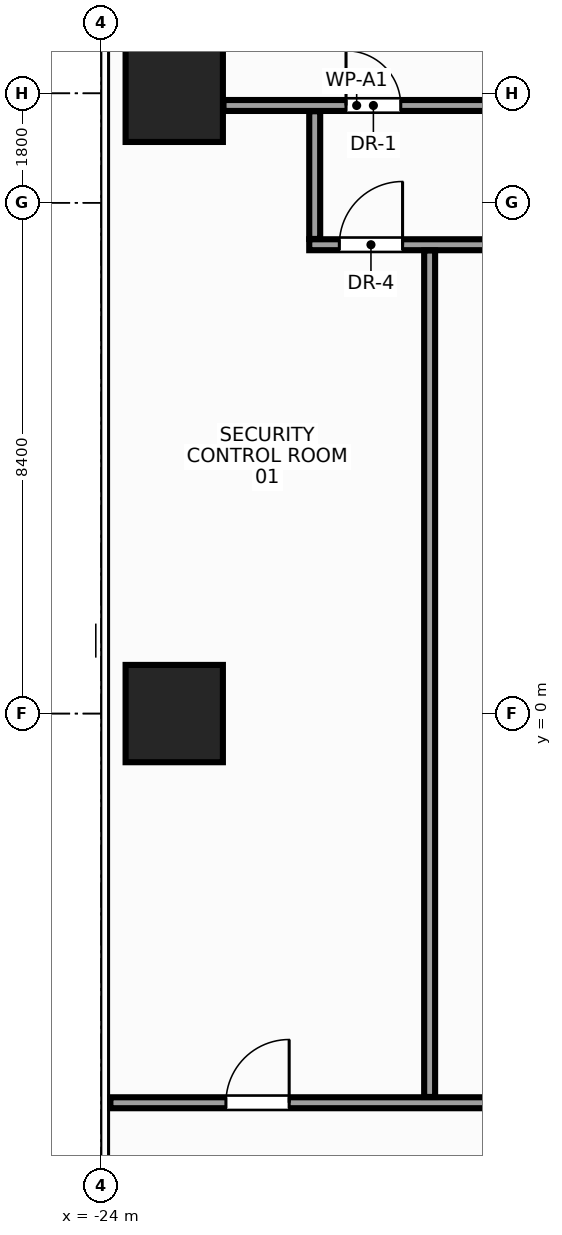
"""IFC4 building model, lengths in metres.
Left out: names, types, materials, properties, quantities, classifications, styles, units other than length and angle.
Written with IfcOpenShell. Run it as: python <this file> out.ifc"""

import sys

from ifc_helpers import new_model, si_unit, direction, frame, frame_2d, origin, origin_2d, place, context, subcontext, project, spatial, rectangle, extrude, source, transform, mapped, element, fill, save


model = new_model("IFC4")
c1 = context("Model", 3, precision=1e-05, world=origin(), true_north=direction((0.0, 1.0)))
c2 = subcontext(c1, "Body", "Model", "MODEL_VIEW")
j1 = project(units=[si_unit("LENGTHUNIT", "METRE"), si_unit("PLANEANGLEUNIT", "RADIAN")], contexts=[c1])
p1 = place(None, origin())
s1 = spatial("IfcSite", under=j1, at=p1, CompositionType="ELEMENT")
p2 = place(p1, origin())
s2 = spatial("IfcBuilding", under=s1, at=p2, CompositionType="ELEMENT")
p3 = place(p2, frame((0.0, 0.0, 171.2)))
s3 = spatial("IfcBuildingStorey", under=s2, at=p3, CompositionType="ELEMENT", Elevation=171.2)
m1 = source(origin(), c2, "Body", "SweptSolid", [
    extrude(rectangle(XDim=1.6, YDim=1.6, at=origin_2d()), origin(), (0.0, 0.0, 1.0), 3.6),
])
for number, where, z_axis, x_axis in (
    (1, (-22.8, 0.0, 0.0), (0.0, 0.0, 1.0), (1.0, 0.0, 0.0)),
    (2, (-22.8, 10.2, 0.0), (0.0, 0.0, 1.0), (1.0, 0.0, 0.0)),
):
    element("IfcColumn", number, at=place(p3, frame(where, z_axis=z_axis, x_axis=x_axis)), inside=s3, PredefinedType="COLUMN", context=c2, shape_type="MappedRepresentation", body=[
        mapped(m1, transform((0.0, 0.0, 0.0), x_axis=(1.0, 0.0, 0.0), y_axis=(0.0, 1.0, 0.0), z_axis=(0.0, 0.0, 1.0), scale=1.0)),
    ])
m2 = source(origin(), c2, "Body", "SweptSolid", [
    extrude(rectangle(XDim=4.38, YDim=0.18, at=frame_2d((2.19, 0.0))), origin(), (0.0, 0.0, 1.0), 2.915),
])
p4 = place(p3, frame((-21.99, 10.0, 0.0), z_axis=(0.0, 0.0, 1.0), x_axis=(1.0, 0.0, 0.0)))
e3 = element("IfcWall", 3, at=p4, inside=s3, PredefinedType="PARTITIONING", context=c2, shape_type="MappedRepresentation", body=[
    mapped(m2, transform((0.0, 0.0, 0.0), x_axis=(1.0, 0.0, 0.0), y_axis=(0.0, 1.0, 0.0), z_axis=(0.0, 0.0, 1.0), scale=1.0)),
])
p5 = place(p4, frame((2.015, 0.0, 0.0)))
e4 = element("IfcOpeningElement", 4, at=p5, cuts=e3, PredefinedType="OPENING", context=c2, shape_type="SweptSolid", body=[
    extrude(rectangle(XDim=0.9, YDim=2.15, at=frame_2d((0.45, 1.075))), frame((0.0, 0.102, 0.0), z_axis=(0.0, -1.0, 0.0), x_axis=(1.0, 0.0, 0.0)), (0.0, 0.0, 1.0), 0.204),
])
m3 = source(origin(), c2, "Body", "SweptSolid", [
    extrude(rectangle(XDim=31.6, YDim=0.18, at=frame_2d((15.8, 0.0))), origin(), (0.0, 0.0, 1.0), 2.765),
])
p6 = place(p3, frame((-20.58, 7.71, 0.0), z_axis=(0.0, 0.0, 1.0), x_axis=(1.0, 0.0, 0.0)))
e5 = element("IfcWall", 5, at=p6, inside=s3, PredefinedType="PARTITIONING", context=c2, shape_type="MappedRepresentation", body=[
    mapped(m3, transform((0.0, 0.0, 0.0), x_axis=(1.0, 0.0, 0.0), y_axis=(0.0, 1.0, 0.0), z_axis=(0.0, 0.0, 1.0), scale=1.0)),
])
p7 = place(p6, frame((0.495, 0.0, 0.0)))
e6 = element("IfcOpeningElement", 6, at=p7, cuts=e5, PredefinedType="OPENING", context=c2, shape_type="SweptSolid", body=[
    extrude(rectangle(XDim=1.04, YDim=2.2, at=frame_2d((0.52, 1.1))), frame((0.0, 0.102, 0.0), z_axis=(0.0, -1.0, 0.0), x_axis=(1.0, 0.0, 0.0)), (0.0, 0.0, 1.0), 0.204),
])
p8 = place(p6, frame((5.16, 0.0, 0.0)))
e7 = element("IfcOpeningElement", 7, at=p8, cuts=e5, PredefinedType="OPENING", context=c2, shape_type="SweptSolid", body=[
    extrude(rectangle(XDim=1.04, YDim=2.2, at=frame_2d((0.52, 1.1))), frame((0.0, 0.102, 0.0), z_axis=(0.0, -1.0, 0.0), x_axis=(1.0, 0.0, 0.0)), (0.0, 0.0, 1.0), 0.204),
])
p9 = place(p6, frame((19.86, 0.0, 0.0)))
e8 = element("IfcOpeningElement", 8, at=p9, cuts=e5, PredefinedType="OPENING", context=c2, shape_type="SweptSolid", body=[
    extrude(rectangle(XDim=1.04, YDim=2.2, at=frame_2d((0.52, 1.1))), frame((0.0, 0.102, 0.0), z_axis=(0.0, -1.0, 0.0), x_axis=(1.0, 0.0, 0.0)), (0.0, 0.0, 1.0), 0.204),
])
m4 = source(origin(), c2, "Body", "SweptSolid", [
    extrude(rectangle(XDim=2.1, YDim=0.18, at=frame_2d((1.05, 0.0))), origin(), (0.0, 0.0, 1.0), 3.38),
])
p10 = place(p3, frame((-20.49, 7.805, 0.0), z_axis=(0.0, 0.0, 1.0), x_axis=(0.0, 1.0, 0.0)))
e9 = element("IfcWall", 9, at=p10, inside=s3, PredefinedType="PARTITIONING", context=c2, shape_type="MappedRepresentation", body=[
    mapped(m4, transform((0.0, 0.0, 0.0), x_axis=(1.0, 0.0, 0.0), y_axis=(0.0, 1.0, 0.0), z_axis=(0.0, 0.0, 1.0), scale=1.0)),
])
m5 = source(origin(), c2, "Body", "SweptSolid", [
    extrude(rectangle(XDim=34.865, YDim=0.18, at=frame_2d((17.433, 0.0))), origin(), (0.0, 0.0, 1.0), 2.765),
])
p11 = place(p3, frame((-23.85, -6.4, 0.0), z_axis=(0.0, 0.0, 1.0), x_axis=(1.0, 0.0, 0.0)))
e10 = element("IfcWall", 10, at=p11, inside=s3, PredefinedType="PARTITIONING", context=c2, shape_type="MappedRepresentation", body=[
    mapped(m5, transform((0.0, 0.0, 0.0), x_axis=(1.0, 0.0, 0.0), y_axis=(0.0, 1.0, 0.0), z_axis=(0.0, 0.0, 1.0), scale=1.0)),
])
p12 = place(p11, frame((1.9, 0.0, 0.0)))
e11 = element("IfcOpeningElement", 11, at=p12, cuts=e10, PredefinedType="OPENING", context=c2, shape_type="SweptSolid", body=[
    extrude(rectangle(XDim=1.04, YDim=2.2, at=frame_2d((0.52, 1.1))), frame((0.0, 0.102, 0.0), z_axis=(0.0, -1.0, 0.0), x_axis=(1.0, 0.0, 0.0)), (0.0, 0.0, 1.0), 0.204),
])
p13 = place(p11, frame((9.33, 0.0, 0.0)))
e12 = element("IfcOpeningElement", 12, at=p13, cuts=e10, PredefinedType="OPENING", context=c2, shape_type="SweptSolid", body=[
    extrude(rectangle(XDim=1.04, YDim=2.2, at=frame_2d((0.52, 1.1))), frame((0.0, 0.102, 0.0), z_axis=(0.0, -1.0, 0.0), x_axis=(1.0, 0.0, 0.0)), (0.0, 0.0, 1.0), 0.204),
])
p14 = place(p11, frame((21.33, 0.0, 0.0)))
e13 = element("IfcOpeningElement", 13, at=p14, cuts=e10, PredefinedType="OPENING", context=c2, shape_type="SweptSolid", body=[
    extrude(rectangle(XDim=1.04, YDim=2.2, at=frame_2d((0.52, 1.1))), frame((0.0, 0.102, 0.0), z_axis=(0.0, -1.0, 0.0), x_axis=(1.0, 0.0, 0.0)), (0.0, 0.0, 1.0), 0.204),
])
m6 = source(origin(), c2, "Body", "SweptSolid", [
    extrude(rectangle(XDim=13.92, YDim=0.18, at=frame_2d((6.96, 0.0))), origin(), (0.0, 0.0, 1.0), 2.915),
])
p15 = place(p3, frame((-18.6, -6.305, 0.0), z_axis=(0.0, 0.0, 1.0), x_axis=(0.0, 1.0, 0.0)))
e14 = element("IfcWall", 14, at=p15, inside=s3, PredefinedType="PARTITIONING", context=c2, shape_type="MappedRepresentation", body=[
    mapped(m6, transform((0.0, 0.0, 0.0), x_axis=(1.0, 0.0, 0.0), y_axis=(0.0, 1.0, 0.0), z_axis=(0.0, 0.0, 1.0), scale=1.0)),
])
m7 = source(origin(), c2, "Body", "SweptSolid", [
    extrude(rectangle(XDim=0.9, YDim=2.15, at=frame_2d((0.45, 1.075))), frame((0.0, 0.025, 0.0), z_axis=(0.0, -1.0, 0.0), x_axis=(1.0, 0.0, 0.0)), (0.0, 0.0, 1.0), 0.05),
])
p16 = place(p5, origin())
e15 = element("IfcDoor", 15, at=p16, inside=s3, OperationType="SINGLE_SWING_LEFT", PredefinedType="DOOR", context=c2, shape_type="MappedRepresentation", body=[
    mapped(m7, transform((0.0, 0.0, 0.0), x_axis=(1.0, 0.0, 0.0), y_axis=(0.0, 1.0, 0.0), z_axis=(0.0, 0.0, 1.0), scale=1.0)),
])
fill(e4, e15)
m8 = source(origin(), c2, "Body", "SweptSolid", [
    extrude(rectangle(XDim=1.04, YDim=2.2, at=frame_2d((0.52, 1.1))), frame((0.0, 0.025, 0.0), z_axis=(0.0, -1.0, 0.0), x_axis=(1.0, 0.0, 0.0)), (0.0, 0.0, 1.0), 0.05),
])
p17 = place(p7, origin())
e16 = element("IfcDoor", 16, at=p17, inside=s3, OperationType="SINGLE_SWING_RIGHT", PredefinedType="DOOR", context=c2, shape_type="MappedRepresentation", body=[
    mapped(m8, transform((0.0, 0.0, 0.0), x_axis=(1.0, 0.0, 0.0), y_axis=(0.0, 1.0, 0.0), z_axis=(0.0, 0.0, 1.0), scale=1.0)),
])
fill(e6, e16)
p18 = place(p12, origin())
e17 = element("IfcDoor", 17, at=p18, inside=s3, OperationType="SINGLE_SWING_RIGHT", PredefinedType="DOOR", context=c2, shape_type="MappedRepresentation", body=[
    mapped(m8, transform((0.0, 0.0, 0.0), x_axis=(1.0, 0.0, 0.0), y_axis=(0.0, 1.0, 0.0), z_axis=(0.0, 0.0, 1.0), scale=1.0)),
])
fill(e11, e17)
save(model, sys.argv[1])
